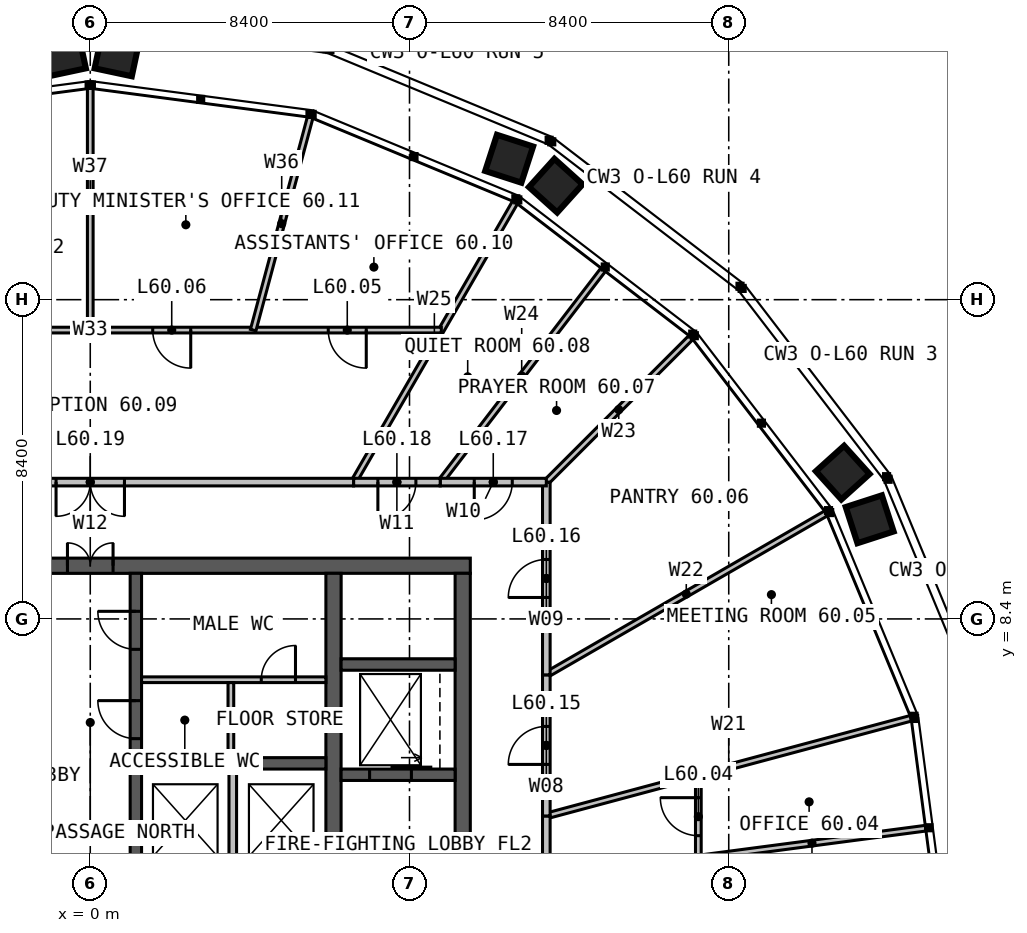
"""IFC4 building model, lengths in metres.
Left out: names, types, materials, properties, quantities, classifications, styles, units other than length and angle.
Written with IfcOpenShell. Run it as: python <this file> out.ifc"""

import sys

from ifc_helpers import new_model, si_unit, direction, frame, frame_2d, origin, place, context, subcontext, project, spatial, rectangle, extrude, element, fill, save


model = new_model("IFC4")
c1 = context("Model", 3, precision=1e-05, world=origin(), true_north=direction((0.0, 1.0)))
c2 = subcontext(c1, "Body", "Model", "MODEL_VIEW")
j1 = project(units=[si_unit("LENGTHUNIT", "METRE"), si_unit("PLANEANGLEUNIT", "RADIAN")], contexts=[c1])
p1 = place(None, origin())
s1 = spatial("IfcSite", under=j1, at=p1, CompositionType="ELEMENT")
p2 = place(p1, origin())
s2 = spatial("IfcBuilding", under=s1, at=p2, CompositionType="ELEMENT")
p3 = place(p2, frame((0.0, 0.0, 248.0)))
s3 = spatial("IfcBuildingStorey", under=s2, at=p3, CompositionType="ELEMENT", Elevation=248.0)
p4 = place(p3, frame((-10.0, 9.8, 0.0), z_axis=(0.0, 0.0, 1.0), x_axis=(1.0, 0.0, 0.0)))
e1 = element("IfcWall", 1, at=p4, inside=s3, PredefinedType="SOLIDWALL", context=c2, shape_type="SweptSolid", body=[
    extrude(rectangle(XDim=20.0, YDim=0.4, at=frame_2d((10.0, 0.0))), origin(), (0.0, 0.0, 1.0), 4.0),
])
p5 = place(p4, frame((9.4, 0.0, 0.0)))
e2 = element("IfcOpeningElement", 2, at=p5, cuts=e1, PredefinedType="OPENING", context=c2, shape_type="SweptSolid", body=[
    extrude(rectangle(XDim=1.2, YDim=2.2, at=frame_2d((0.6, 1.1))), frame((0.0, 0.21, 0.0), z_axis=(0.0, -1.0, 0.0), x_axis=(1.0, 0.0, 0.0)), (0.0, 0.0, 1.0), 0.42),
])
p6 = place(p3, frame((9.8, -9.6, 0.0), z_axis=(0.0, 0.0, 1.0), x_axis=(0.0, 1.0, 0.0)))
e3 = element("IfcWall", 3, at=p6, inside=s3, PredefinedType="SOLIDWALL", context=c2, shape_type="SweptSolid", body=[
    extrude(rectangle(XDim=19.2, YDim=0.4, at=frame_2d((9.6, 0.0))), origin(), (0.0, 0.0, 1.0), 4.0),
])
p7 = place(p3, frame((6.4, 9.6, 0.0), z_axis=(0.0, 0.0, 1.0), x_axis=(0.0, -1.0, 0.0)))
e4 = element("IfcWall", 4, at=p7, inside=s3, PredefinedType="SOLIDWALL", context=c2, shape_type="SweptSolid", body=[
    extrude(rectangle(XDim=19.2, YDim=0.4, at=frame_2d((9.6, 0.0))), origin(), (0.0, 0.0, 1.0), 4.0),
])
p8 = place(p7, frame((9.1, 0.0, 0.0)))
e5 = element("IfcOpeningElement", 5, at=p8, cuts=e4, PredefinedType="OPENING", context=c2, shape_type="SweptSolid", body=[
    extrude(rectangle(XDim=1.0, YDim=2.2, at=frame_2d((0.5, 1.1))), frame((0.0, 0.21, 0.0), z_axis=(0.0, -1.0, 0.0), x_axis=(1.0, 0.0, 0.0)), (0.0, 0.0, 1.0), 0.42),
])
p9 = place(p3, frame((1.35, 4.6, 0.0), z_axis=(0.0, 0.0, 1.0), x_axis=(1.0, 0.0, 0.0)))
e6 = element("IfcWall", 6, at=p9, inside=s3, PredefinedType="SOLIDWALL", context=c2, shape_type="SweptSolid", body=[
    extrude(rectangle(XDim=4.85, YDim=0.3, at=frame_2d((2.425, 0.0))), origin(), (0.0, 0.0, 1.0), 4.0),
])
p10 = place(p3, frame((1.2, 1.45, 0.0), z_axis=(0.0, 0.0, 1.0), x_axis=(0.0, 1.0, 0.0)))
e7 = element("IfcWall", 7, at=p10, inside=s3, PredefinedType="SOLIDWALL", context=c2, shape_type="SweptSolid", body=[
    extrude(rectangle(XDim=8.15, YDim=0.3, at=frame_2d((4.075, 0.0))), origin(), (0.0, 0.0, 1.0), 4.0),
])
p11 = place(p10, frame((3.8, 0.0, 0.0)))
e8 = element("IfcOpeningElement", 8, at=p11, cuts=e7, PredefinedType="OPENING", context=c2, shape_type="SweptSolid", body=[
    extrude(rectangle(XDim=1.0, YDim=2.2, at=frame_2d((0.5, 1.1))), frame((0.0, 0.16, 0.0), z_axis=(0.0, -1.0, 0.0), x_axis=(1.0, 0.0, 0.0)), (0.0, 0.0, 1.0), 0.32),
])
p12 = place(p10, frame((6.15, 0.0, 0.0)))
e9 = element("IfcOpeningElement", 9, at=p12, cuts=e7, PredefinedType="OPENING", context=c2, shape_type="SweptSolid", body=[
    extrude(rectangle(XDim=1.0, YDim=2.2, at=frame_2d((0.5, 1.1))), frame((0.0, 0.16, 0.0), z_axis=(0.0, -1.0, 0.0), x_axis=(1.0, 0.0, 0.0)), (0.0, 0.0, 1.0), 0.32),
])
p13 = place(p3, frame((6.6, 4.3, 0.0), z_axis=(0.0, 0.0, 1.0), x_axis=(1.0, 0.0, 0.0)))
e10 = element("IfcWall", 10, at=p13, inside=s3, PredefinedType="SOLIDWALL", context=c2, shape_type="SweptSolid", body=[
    extrude(rectangle(XDim=3.0, YDim=0.3, at=frame_2d((1.5, 0.0))), origin(), (0.0, 0.0, 1.0), 4.0),
])
p14 = place(p13, frame((0.75, 0.0, 0.0)))
e11 = element("IfcOpeningElement", 11, at=p14, cuts=e10, PredefinedType="OPENING", context=c2, shape_type="SweptSolid", body=[
    extrude(rectangle(XDim=1.1, YDim=2.2, at=frame_2d((0.55, 1.1))), frame((0.0, 0.16, 0.0), z_axis=(0.0, -1.0, 0.0), x_axis=(1.0, 0.0, 0.0)), (0.0, 0.0, 1.0), 0.32),
])
p15 = place(p3, frame((6.6, 7.2, 0.0), z_axis=(0.0, 0.0, 1.0), x_axis=(1.0, 0.0, 0.0)))
e12 = element("IfcWall", 12, at=p15, inside=s3, PredefinedType="SOLIDWALL", context=c2, shape_type="SweptSolid", body=[
    extrude(rectangle(XDim=3.0, YDim=0.3, at=frame_2d((1.5, 0.0))), origin(), (0.0, 0.0, 1.0), 4.0),
])
p16 = place(p3, frame((3.75, 1.75, 0.0), z_axis=(0.0, 0.0, 1.0), x_axis=(0.0, 1.0, 0.0)))
e13 = element("IfcWall", 13, at=p16, inside=s3, PredefinedType="SOLIDWALL", context=c2, shape_type="SweptSolid", body=[
    extrude(rectangle(XDim=2.7, YDim=0.2, at=frame_2d((1.35, 0.0))), origin(), (0.0, 0.0, 1.0), 3.75),
])
p17 = place(p3, frame((1.35, 6.8, 0.0), z_axis=(0.0, 0.0, 1.0), x_axis=(1.0, 0.0, 0.0)))
e14 = element("IfcWall", 14, at=p17, inside=s3, PredefinedType="PARTITIONING", context=c2, shape_type="SweptSolid", body=[
    extrude(rectangle(XDim=4.85, YDim=0.15, at=frame_2d((2.425, 0.0))), origin(), (0.0, 0.0, 1.0), 3.75),
])
p18 = place(p17, frame((3.15, 0.0, 0.0)))
e15 = element("IfcOpeningElement", 15, at=p18, cuts=e14, PredefinedType="OPENING", context=c2, shape_type="SweptSolid", body=[
    extrude(rectangle(XDim=0.9, YDim=2.2, at=frame_2d((0.45, 1.1))), frame((0.0, 0.085, 0.0), z_axis=(0.0, -1.0, 0.0), x_axis=(1.0, 0.0, 0.0)), (0.0, 0.0, 1.0), 0.17),
])
p19 = place(p3, frame((3.7, 4.75, 0.0), z_axis=(0.0, 0.0, 1.0), x_axis=(0.0, 1.0, 0.0)))
e16 = element("IfcWall", 16, at=p19, inside=s3, PredefinedType="PARTITIONING", context=c2, shape_type="SweptSolid", body=[
    extrude(rectangle(XDim=1.975, YDim=0.15, at=frame_2d((0.988, 0.0))), origin(), (0.0, 0.0, 1.0), 3.75),
])
p20 = place(p3, frame((12.0, 3.215, 0.0), z_axis=(0.0, 0.0, 1.0), x_axis=(0.965922720407, 0.258830636135, 0.0)))
e17 = element("IfcWall", 17, at=p20, inside=s3, PredefinedType="PARTITIONING", context=c2, shape_type="SweptSolid", body=[
    extrude(rectangle(XDim=9.938, YDim=0.15, at=frame_2d((4.969, 0.0))), origin(), (0.0, 0.0, 1.0), 2.79),
])
p21 = place(p3, frame((12.0, 6.928, 0.0), z_axis=(0.0, 0.0, 1.0), x_axis=(0.866026401553, 0.49999827181, 0.0)))
e18 = element("IfcWall", 18, at=p21, inside=s3, PredefinedType="PARTITIONING", context=c2, shape_type="SweptSolid", body=[
    extrude(rectangle(XDim=8.505, YDim=0.15, at=frame_2d((4.252, 0.0))), origin(), (0.0, 0.0, 1.0), 2.79),
])
p22 = place(p3, frame((12.0, 12.0, 0.0), z_axis=(0.0, 0.0, 1.0), x_axis=(0.707106781187, 0.707106781187, 0.0)))
e19 = element("IfcWall", 19, at=p22, inside=s3, PredefinedType="PARTITIONING", context=c2, shape_type="SweptSolid", body=[
    extrude(rectangle(XDim=5.391, YDim=0.15, at=frame_2d((2.695, 0.0))), origin(), (0.0, 0.0, 1.0), 2.79),
])
p23 = place(p3, frame((9.208, 12.0, 0.0), z_axis=(0.0, 0.0, 1.0), x_axis=(0.608742186743, 0.79336810503, 0.0)))
e20 = element("IfcWall", 20, at=p23, inside=s3, PredefinedType="PARTITIONING", context=c2, shape_type="SweptSolid", body=[
    extrude(rectangle(XDim=7.044, YDim=0.15, at=frame_2d((3.522, 0.0))), origin(), (0.0, 0.0, 1.0), 2.79),
])
p24 = place(p3, frame((6.928, 12.0, 0.0), z_axis=(0.0, 0.0, 1.0), x_axis=(0.49999827181, 0.866026401553, 0.0)))
e21 = element("IfcWall", 21, at=p24, inside=s3, PredefinedType="PARTITIONING", context=c2, shape_type="SweptSolid", body=[
    extrude(rectangle(XDim=8.505, YDim=0.15, at=frame_2d((4.252, 0.0))), origin(), (0.0, 0.0, 1.0), 2.79),
])
p25 = place(p3, frame((16.0, -9.238, 0.0), z_axis=(0.0, 0.0, 1.0), x_axis=(0.0, 1.0, 0.0)))
e22 = element("IfcWall", 22, at=p25, inside=s3, PredefinedType="PARTITIONING", context=c2, shape_type="SweptSolid", body=[
    extrude(rectangle(XDim=13.525, YDim=0.15, at=frame_2d((6.762, 0.0))), origin(), (0.0, 0.0, 1.0), 2.79),
])
p26 = place(p25, frame((1.975, 0.0, 0.0)))
e23 = element("IfcOpeningElement", 23, at=p26, cuts=e22, PredefinedType="OPENING", context=c2, shape_type="SweptSolid", body=[
    extrude(rectangle(XDim=1.0, YDim=2.2, at=frame_2d((0.5, 1.1))), frame((0.0, 0.085, 0.0), z_axis=(0.0, -1.0, 0.0), x_axis=(1.0, 0.0, 0.0)), (0.0, 0.0, 1.0), 0.17),
])
p27 = place(p25, frame((7.647, 0.0, 0.0)))
e24 = element("IfcOpeningElement", 24, at=p27, cuts=e22, PredefinedType="OPENING", context=c2, shape_type="SweptSolid", body=[
    extrude(rectangle(XDim=1.0, YDim=2.2, at=frame_2d((0.5, 1.1))), frame((0.0, 0.085, 0.0), z_axis=(0.0, -1.0, 0.0), x_axis=(1.0, 0.0, 0.0)), (0.0, 0.0, 1.0), 0.17),
])
p28 = place(p25, frame((11.934, 0.0, 0.0)))
e25 = element("IfcOpeningElement", 25, at=p28, cuts=e22, PredefinedType="OPENING", context=c2, shape_type="SweptSolid", body=[
    extrude(rectangle(XDim=1.0, YDim=2.2, at=frame_2d((0.5, 1.1))), frame((0.0, 0.085, 0.0), z_axis=(0.0, -1.0, 0.0), x_axis=(1.0, 0.0, 0.0)), (0.0, 0.0, 1.0), 0.17),
])
p29 = place(p3, frame((16.0, 2.106, 0.0), z_axis=(0.0, 0.0, 1.0), x_axis=(0.991443960057, 0.130533038219, 0.0)))
e26 = element("IfcWall", 26, at=p29, inside=s3, PredefinedType="PARTITIONING", context=c2, shape_type="SweptSolid", body=[
    extrude(rectangle(XDim=6.032, YDim=0.15, at=frame_2d((3.016, 0.0))), origin(), (0.0, 0.0, 1.0), 2.79),
])
p30 = place(p3, frame((12.0, -6.928, 0.0), z_axis=(0.0, 0.0, 1.0), x_axis=(0.0, 1.0, 0.0)))
e27 = element("IfcWall", 27, at=p30, inside=s3, PredefinedType="PARTITIONING", context=c2, shape_type="SweptSolid", body=[
    extrude(rectangle(XDim=10.144, YDim=0.2, at=frame_2d((5.072, 0.0))), origin(), (0.0, 0.0, 1.0), 3.8),
])
p31 = place(p30, frame((4.172, 0.0, 0.0)))
e28 = element("IfcOpeningElement", 28, at=p31, cuts=e27, PredefinedType="OPENING", context=c2, shape_type="SweptSolid", body=[
    extrude(rectangle(XDim=1.8, YDim=2.2, at=frame_2d((0.9, 1.1))), frame((0.0, 0.11, 0.0), z_axis=(0.0, -1.0, 0.0), x_axis=(1.0, 0.0, 0.0)), (0.0, 0.0, 1.0), 0.22),
])
p32 = place(p3, frame((12.0, 3.215, 0.0), z_axis=(0.0, 0.0, 1.0), x_axis=(0.0, 1.0, 0.0)))
e29 = element("IfcWall", 29, at=p32, inside=s3, PredefinedType="PARTITIONING", context=c2, shape_type="SweptSolid", body=[
    extrude(rectangle(XDim=3.713, YDim=0.2, at=frame_2d((1.856, 0.0))), origin(), (0.0, 0.0, 1.0), 3.8),
])
p33 = place(p32, frame((1.356, 0.0, 0.0)))
e30 = element("IfcOpeningElement", 30, at=p33, cuts=e29, PredefinedType="OPENING", context=c2, shape_type="SweptSolid", body=[
    extrude(rectangle(XDim=1.0, YDim=2.2, at=frame_2d((0.5, 1.1))), frame((0.0, 0.11, 0.0), z_axis=(0.0, -1.0, 0.0), x_axis=(1.0, 0.0, 0.0)), (0.0, 0.0, 1.0), 0.22),
])
p34 = place(p3, frame((12.0, 6.928, 0.0), z_axis=(0.0, 0.0, 1.0), x_axis=(0.0, 1.0, 0.0)))
e31 = element("IfcWall", 31, at=p34, inside=s3, PredefinedType="PARTITIONING", context=c2, shape_type="SweptSolid", body=[
    extrude(rectangle(XDim=5.072, YDim=0.2, at=frame_2d((2.536, 0.0))), origin(), (0.0, 0.0, 1.0), 3.8),
])
p35 = place(p34, frame((2.036, 0.0, 0.0)))
e32 = element("IfcOpeningElement", 32, at=p35, cuts=e31, PredefinedType="OPENING", context=c2, shape_type="SweptSolid", body=[
    extrude(rectangle(XDim=1.0, YDim=2.2, at=frame_2d((0.5, 1.1))), frame((0.0, 0.11, 0.0), z_axis=(0.0, -1.0, 0.0), x_axis=(1.0, 0.0, 0.0)), (0.0, 0.0, 1.0), 0.22),
])
p36 = place(p3, frame((12.0, 12.0, 0.0), z_axis=(0.0, 0.0, 1.0), x_axis=(-1.0, 0.0, 0.0)))
e33 = element("IfcWall", 33, at=p36, inside=s3, PredefinedType="PARTITIONING", context=c2, shape_type="SweptSolid", body=[
    extrude(rectangle(XDim=2.792, YDim=0.2, at=frame_2d((1.396, 0.0))), origin(), (0.0, 0.0, 1.0), 3.8),
])
p37 = place(p36, frame((0.896, 0.0, 0.0)))
e34 = element("IfcOpeningElement", 34, at=p37, cuts=e33, PredefinedType="OPENING", context=c2, shape_type="SweptSolid", body=[
    extrude(rectangle(XDim=1.0, YDim=2.2, at=frame_2d((0.5, 1.1))), frame((0.0, 0.11, 0.0), z_axis=(0.0, -1.0, 0.0), x_axis=(1.0, 0.0, 0.0)), (0.0, 0.0, 1.0), 0.22),
])
p38 = place(p3, frame((9.208, 12.0, 0.0), z_axis=(0.0, 0.0, 1.0), x_axis=(-1.0, 0.0, 0.0)))
e35 = element("IfcWall", 35, at=p38, inside=s3, PredefinedType="PARTITIONING", context=c2, shape_type="SweptSolid", body=[
    extrude(rectangle(XDim=2.28, YDim=0.2, at=frame_2d((1.14, 0.0))), origin(), (0.0, 0.0, 1.0), 3.8),
])
p39 = place(p38, frame((0.64, 0.0, 0.0)))
e36 = element("IfcOpeningElement", 36, at=p39, cuts=e35, PredefinedType="OPENING", context=c2, shape_type="SweptSolid", body=[
    extrude(rectangle(XDim=1.0, YDim=2.2, at=frame_2d((0.5, 1.1))), frame((0.0, 0.11, 0.0), z_axis=(0.0, -1.0, 0.0), x_axis=(1.0, 0.0, 0.0)), (0.0, 0.0, 1.0), 0.22),
])
p40 = place(p3, frame((9.238, 16.0, 0.0), z_axis=(0.0, 0.0, 1.0), x_axis=(-1.0, 0.0, 0.0)))
e37 = element("IfcWall", 37, at=p40, inside=s3, PredefinedType="PARTITIONING", context=c2, shape_type="SweptSolid", body=[
    extrude(rectangle(XDim=18.475, YDim=0.15, at=frame_2d((9.238, 0.0))), origin(), (0.0, 0.0, 1.0), 2.79),
])
p41 = place(p40, frame((1.975, 0.0, 0.0)))
e38 = element("IfcOpeningElement", 38, at=p41, cuts=e37, PredefinedType="OPENING", context=c2, shape_type="SweptSolid", body=[
    extrude(rectangle(XDim=1.0, YDim=2.2, at=frame_2d((0.5, 1.1))), frame((0.0, 0.085, 0.0), z_axis=(0.0, -1.0, 0.0), x_axis=(1.0, 0.0, 0.0)), (0.0, 0.0, 1.0), 0.17),
])
p42 = place(p40, frame((6.594, 0.0, 0.0)))
e39 = element("IfcOpeningElement", 39, at=p42, cuts=e37, PredefinedType="OPENING", context=c2, shape_type="SweptSolid", body=[
    extrude(rectangle(XDim=1.0, YDim=2.2, at=frame_2d((0.5, 1.1))), frame((0.0, 0.085, 0.0), z_axis=(0.0, -1.0, 0.0), x_axis=(1.0, 0.0, 0.0)), (0.0, 0.0, 1.0), 0.17),
])
p43 = place(p40, frame((10.881, 0.0, 0.0)))
e40 = element("IfcOpeningElement", 40, at=p43, cuts=e37, PredefinedType="OPENING", context=c2, shape_type="SweptSolid", body=[
    extrude(rectangle(XDim=1.0, YDim=2.2, at=frame_2d((0.5, 1.1))), frame((0.0, 0.085, 0.0), z_axis=(0.0, -1.0, 0.0), x_axis=(1.0, 0.0, 0.0)), (0.0, 0.0, 1.0), 0.17),
])
p44 = place(p40, frame((14.195, 0.0, 0.0)))
e41 = element("IfcOpeningElement", 41, at=p44, cuts=e37, PredefinedType="OPENING", context=c2, shape_type="SweptSolid", body=[
    extrude(rectangle(XDim=1.0, YDim=2.2, at=frame_2d((0.5, 1.1))), frame((0.0, 0.085, 0.0), z_axis=(0.0, -1.0, 0.0), x_axis=(1.0, 0.0, 0.0)), (0.0, 0.0, 1.0), 0.17),
])
p45 = place(p40, frame((16.67, 0.0, 0.0)))
e42 = element("IfcOpeningElement", 42, at=p45, cuts=e37, PredefinedType="OPENING", context=c2, shape_type="SweptSolid", body=[
    extrude(rectangle(XDim=1.0, YDim=2.2, at=frame_2d((0.5, 1.1))), frame((0.0, 0.085, 0.0), z_axis=(0.0, -1.0, 0.0), x_axis=(1.0, 0.0, 0.0)), (0.0, 0.0, 1.0), 0.17),
])
p46 = place(p3, frame((4.287, 16.0, 0.0), z_axis=(0.0, 0.0, 1.0), x_axis=(0.258842042881, 0.96591966376, 0.0)))
e43 = element("IfcWall", 43, at=p46, inside=s3, PredefinedType="PARTITIONING", context=c2, shape_type="SweptSolid", body=[
    extrude(rectangle(XDim=5.797, YDim=0.15, at=frame_2d((2.898, 0.0))), origin(), (0.0, 0.0, 1.0), 2.79),
])
p47 = place(p3, frame((0.0, 16.0, 0.0), z_axis=(0.0, 0.0, 1.0), x_axis=(0.0, 1.0, 0.0)))
e44 = element("IfcWall", 44, at=p47, inside=s3, PredefinedType="PARTITIONING", context=c2, shape_type="SweptSolid", body=[
    extrude(rectangle(XDim=6.361, YDim=0.15, at=frame_2d((3.181, 0.0))), origin(), (0.0, 0.0, 1.0), 2.79),
])
p48 = place(p3, frame((6.928, 12.0, 0.0), z_axis=(0.0, 0.0, 1.0), x_axis=(-1.0, 0.0, 0.0)))
e45 = element("IfcWall", 45, at=p48, inside=s3, PredefinedType="PARTITIONING", context=c2, shape_type="SweptSolid", body=[
    extrude(rectangle(XDim=13.856, YDim=0.2, at=frame_2d((6.928, 0.0))), origin(), (0.0, 0.0, 1.0), 3.8),
])
p49 = place(p48, frame((6.028, 0.0, 0.0)))
e46 = element("IfcOpeningElement", 46, at=p49, cuts=e45, PredefinedType="OPENING", context=c2, shape_type="SweptSolid", body=[
    extrude(rectangle(XDim=1.8, YDim=2.2, at=frame_2d((0.9, 1.1))), frame((0.0, 0.11, 0.0), z_axis=(0.0, -1.0, 0.0), x_axis=(1.0, 0.0, 0.0)), (0.0, 0.0, 1.0), 0.22),
])
p50 = place(p5, origin())
e47 = element("IfcDoor", 47, at=p50, inside=s3, OperationType="DOUBLE_DOOR_SINGLE_SWING", PredefinedType="DOOR", context=c2, shape_type="SweptSolid", body=[
    extrude(rectangle(XDim=1.2, YDim=2.2, at=frame_2d((0.6, 1.1))), frame((0.0, 0.025, 0.0), z_axis=(0.0, -1.0, 0.0), x_axis=(1.0, 0.0, 0.0)), (0.0, 0.0, 1.0), 0.05),
])
fill(e2, e47)
p51 = place(p11, origin())
e48 = element("IfcDoor", 48, at=p51, inside=s3, OperationType="SINGLE_SWING_RIGHT", PredefinedType="DOOR", context=c2, shape_type="SweptSolid", body=[
    extrude(rectangle(XDim=1.0, YDim=2.2, at=frame_2d((0.5, 1.1))), frame((0.0, 0.025, 0.0), z_axis=(0.0, -1.0, 0.0), x_axis=(1.0, 0.0, 0.0)), (0.0, 0.0, 1.0), 0.05),
])
fill(e8, e48)
p52 = place(p12, origin())
e49 = element("IfcDoor", 49, at=p52, inside=s3, OperationType="SINGLE_SWING_RIGHT", PredefinedType="DOOR", context=c2, shape_type="SweptSolid", body=[
    extrude(rectangle(XDim=1.0, YDim=2.2, at=frame_2d((0.5, 1.1))), frame((0.0, 0.025, 0.0), z_axis=(0.0, -1.0, 0.0), x_axis=(1.0, 0.0, 0.0)), (0.0, 0.0, 1.0), 0.05),
])
fill(e9, e49)
p53 = place(p18, origin())
e50 = element("IfcDoor", 50, at=p53, inside=s3, OperationType="SINGLE_SWING_RIGHT", PredefinedType="DOOR", context=c2, shape_type="SweptSolid", body=[
    extrude(rectangle(XDim=0.9, YDim=2.2, at=frame_2d((0.45, 1.1))), frame((0.0, 0.025, 0.0), z_axis=(0.0, -1.0, 0.0), x_axis=(1.0, 0.0, 0.0)), (0.0, 0.0, 1.0), 0.05),
])
fill(e15, e50)
p54 = place(p14, origin())
e51 = element("IfcDoor", 51, at=p54, inside=s3, OperationType="SLIDING_TO_LEFT", PredefinedType="DOOR", context=c2, shape_type="SweptSolid", body=[
    extrude(rectangle(XDim=1.1, YDim=2.2, at=frame_2d((0.55, 1.1))), frame((0.0, 0.025, 0.0), z_axis=(0.0, -1.0, 0.0), x_axis=(1.0, 0.0, 0.0)), (0.0, 0.0, 1.0), 0.05),
])
fill(e11, e51)
p55 = place(p28, origin())
e52 = element("IfcDoor", 52, at=p55, inside=s3, OperationType="SINGLE_SWING_RIGHT", PredefinedType="DOOR", context=c2, shape_type="SweptSolid", body=[
    extrude(rectangle(XDim=1.0, YDim=2.2, at=frame_2d((0.5, 1.1))), frame((0.0, 0.025, 0.0), z_axis=(0.0, -1.0, 0.0), x_axis=(1.0, 0.0, 0.0)), (0.0, 0.0, 1.0), 0.05),
])
fill(e25, e52)
p56 = place(p33, origin())
e53 = element("IfcDoor", 53, at=p56, inside=s3, OperationType="SINGLE_SWING_LEFT", PredefinedType="DOOR", context=c2, shape_type="SweptSolid", body=[
    extrude(rectangle(XDim=1.0, YDim=2.2, at=frame_2d((0.5, 1.1))), frame((0.0, 0.025, 0.0), z_axis=(0.0, -1.0, 0.0), x_axis=(1.0, 0.0, 0.0)), (0.0, 0.0, 1.0), 0.05),
])
fill(e30, e53)
p57 = place(p35, origin())
e54 = element("IfcDoor", 54, at=p57, inside=s3, OperationType="SINGLE_SWING_LEFT", PredefinedType="DOOR", context=c2, shape_type="SweptSolid", body=[
    extrude(rectangle(XDim=1.0, YDim=2.2, at=frame_2d((0.5, 1.1))), frame((0.0, 0.025, 0.0), z_axis=(0.0, -1.0, 0.0), x_axis=(1.0, 0.0, 0.0)), (0.0, 0.0, 1.0), 0.05),
])
fill(e32, e54)
p58 = place(p37, origin())
e55 = element("IfcDoor", 55, at=p58, inside=s3, OperationType="SINGLE_SWING_RIGHT", PredefinedType="DOOR", context=c2, shape_type="SweptSolid", body=[
    extrude(rectangle(XDim=1.0, YDim=2.2, at=frame_2d((0.5, 1.1))), frame((0.0, 0.025, 0.0), z_axis=(0.0, -1.0, 0.0), x_axis=(1.0, 0.0, 0.0)), (0.0, 0.0, 1.0), 0.05),
])
fill(e34, e55)
p59 = place(p39, origin())
e56 = element("IfcDoor", 56, at=p59, inside=s3, OperationType="SINGLE_SWING_RIGHT", PredefinedType="DOOR", context=c2, shape_type="SweptSolid", body=[
    extrude(rectangle(XDim=1.0, YDim=2.2, at=frame_2d((0.5, 1.1))), frame((0.0, 0.025, 0.0), z_axis=(0.0, -1.0, 0.0), x_axis=(1.0, 0.0, 0.0)), (0.0, 0.0, 1.0), 0.05),
])
fill(e36, e56)
p60 = place(p41, origin())
e57 = element("IfcDoor", 57, at=p60, inside=s3, OperationType="SINGLE_SWING_LEFT", PredefinedType="DOOR", context=c2, shape_type="SweptSolid", body=[
    extrude(rectangle(XDim=1.0, YDim=2.2, at=frame_2d((0.5, 1.1))), frame((0.0, 0.025, 0.0), z_axis=(0.0, -1.0, 0.0), x_axis=(1.0, 0.0, 0.0)), (0.0, 0.0, 1.0), 0.05),
])
fill(e38, e57)
p61 = place(p42, origin())
e58 = element("IfcDoor", 58, at=p61, inside=s3, OperationType="SINGLE_SWING_LEFT", PredefinedType="DOOR", context=c2, shape_type="SweptSolid", body=[
    extrude(rectangle(XDim=1.0, YDim=2.2, at=frame_2d((0.5, 1.1))), frame((0.0, 0.025, 0.0), z_axis=(0.0, -1.0, 0.0), x_axis=(1.0, 0.0, 0.0)), (0.0, 0.0, 1.0), 0.05),
])
fill(e39, e58)
p62 = place(p49, origin())
e59 = element("IfcDoor", 59, at=p62, inside=s3, OperationType="DOUBLE_DOOR_SINGLE_SWING", PredefinedType="DOOR", context=c2, shape_type="SweptSolid", body=[
    extrude(rectangle(XDim=1.8, YDim=2.2, at=frame_2d((0.9, 1.1))), frame((0.0, 0.025, 0.0), z_axis=(0.0, -1.0, 0.0), x_axis=(1.0, 0.0, 0.0)), (0.0, 0.0, 1.0), 0.05),
])
fill(e46, e59)
save(model, sys.argv[1])
